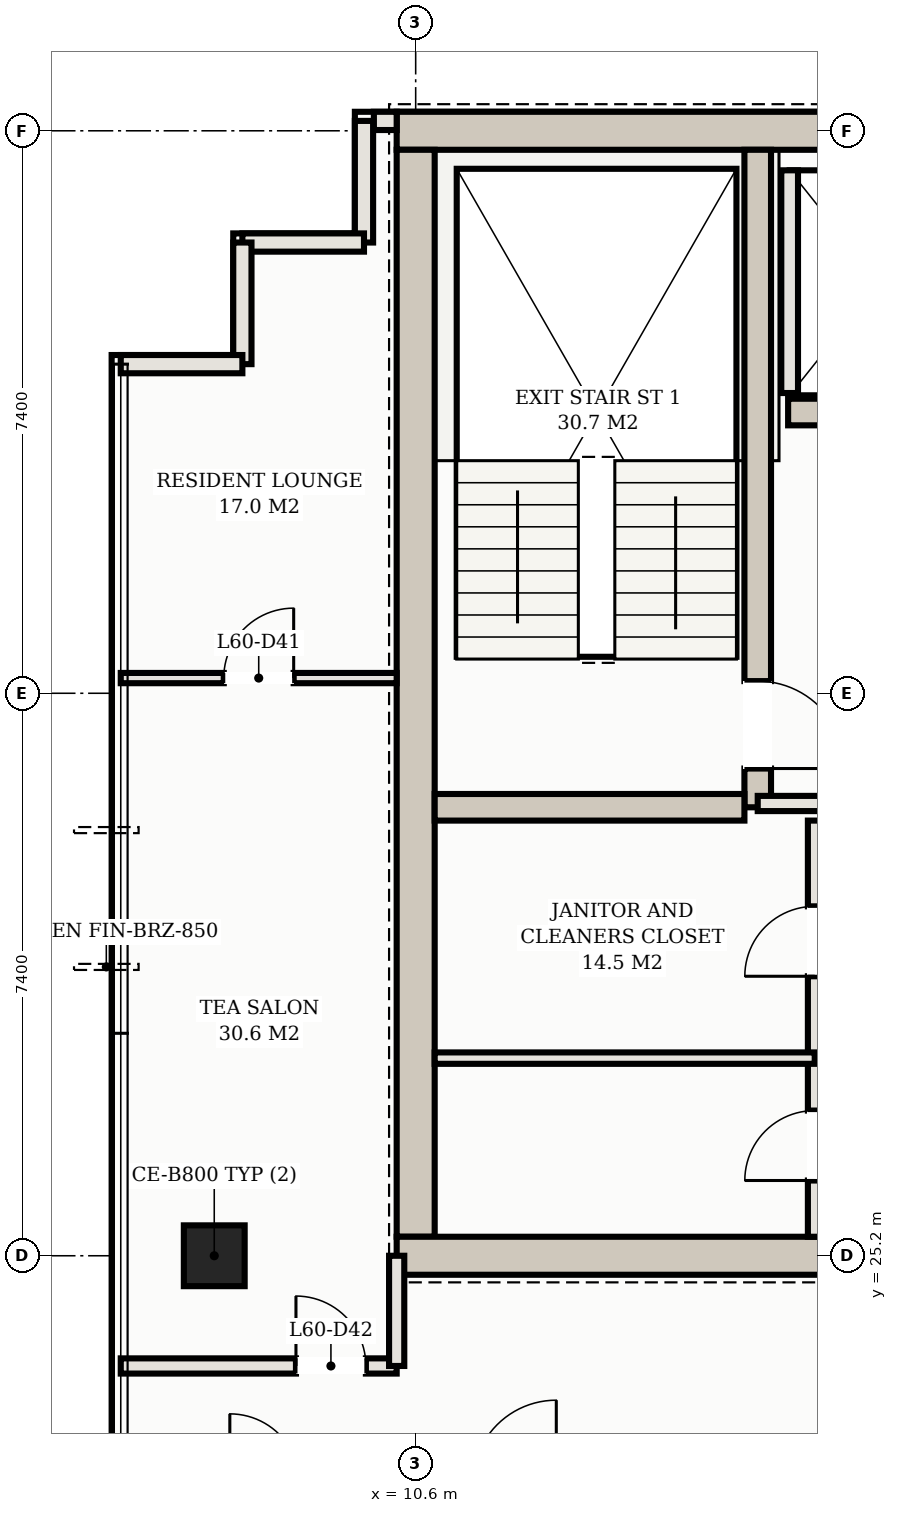
"""IFC4 building model, lengths in metres.
Left out: names, types, materials, properties, quantities, classifications, styles, units other than length and angle.
Written with IfcOpenShell. Run it as: python <this file> out.ifc"""

import sys

from ifc_helpers import new_model, si_unit, direction, frame, frame_2d, origin, origin_2d, place, context, subcontext, project, spatial, rectangle, hollow_rectangle, extrude, element, fill, save


model = new_model("IFC4")
c1 = context("Model", 3, precision=1e-05, world=origin(), true_north=direction((0.0, 1.0)))
c2 = subcontext(c1, "Body", "Model", "MODEL_VIEW")
j1 = project(units=[si_unit("LENGTHUNIT", "METRE"), si_unit("PLANEANGLEUNIT", "RADIAN")], contexts=[c1])
p1 = place(None, origin())
s1 = spatial("IfcSite", under=j1, at=p1, CompositionType="ELEMENT")
p2 = place(p1, origin())
s2 = spatial("IfcBuilding", under=s1, at=p2, CompositionType="ELEMENT")
p3 = place(p2, frame((0.0, 0.0, 219.8)))
s3 = spatial("IfcBuildingStorey", under=s2, at=p3, CompositionType="ELEMENT", Elevation=219.8)
p4 = place(p3, frame((10.35, 40.0, 0.0), z_axis=(0.0, 0.0, 1.0), x_axis=(1.0, 0.0, 0.0)))
e1 = element("IfcWall", 1, at=p4, inside=s3, PredefinedType="SHEAR", context=c2, shape_type="SweptSolid", body=[
    extrude(rectangle(XDim=32.3, YDim=0.5, at=frame_2d((16.15, 0.0))), origin(), (0.0, 0.0, 1.0), 3.11),
])
p5 = place(p3, frame((10.6, 25.45, 0.0), z_axis=(0.0, 0.0, 1.0), x_axis=(0.0, 1.0, 0.0)))
e2 = element("IfcWall", 2, at=p5, inside=s3, PredefinedType="SHEAR", context=c2, shape_type="SweptSolid", body=[
    extrude(rectangle(XDim=14.3, YDim=0.5, at=frame_2d((7.15, 0.0))), origin(), (0.0, 0.0, 1.0), 3.11),
])
p6 = place(p3, frame((10.35, 25.2, 0.0), z_axis=(0.0, 0.0, 1.0), x_axis=(1.0, 0.0, 0.0)))
e3 = element("IfcWall", 3, at=p6, inside=s3, PredefinedType="SHEAR", context=c2, shape_type="SweptSolid", body=[
    extrude(rectangle(XDim=8.05, YDim=0.5, at=frame_2d((4.025, 0.0))), origin(), (0.0, 0.0, 1.0), 3.11),
])
p7 = place(p6, frame((6.15, 0.0, 0.0)))
e4 = element("IfcOpeningElement", 4, at=p7, cuts=e3, PredefinedType="OPENING", context=c2, shape_type="SweptSolid", body=[
    extrude(rectangle(XDim=1.25, YDim=2.2, at=frame_2d((0.625, 1.1))), frame((0.0, 0.26, 0.0), z_axis=(0.0, -1.0, 0.0), x_axis=(1.0, 0.0, 0.0)), (0.0, 0.0, 1.0), 0.52),
])
p8 = place(p3, frame((15.1, 31.1, 0.0), z_axis=(0.0, 0.0, 1.0), x_axis=(0.0, 1.0, 0.0)))
e5 = element("IfcWall", 5, at=p8, inside=s3, PredefinedType="SHEAR", context=c2, shape_type="SweptSolid", body=[
    extrude(rectangle(XDim=8.65, YDim=0.35, at=frame_2d((4.325, 0.0))), origin(), (0.0, 0.0, 1.0), 3.11),
])
p9 = place(p8, frame((0.51, 0.0, 0.0)))
e6 = element("IfcOpeningElement", 6, at=p9, cuts=e5, PredefinedType="OPENING", context=c2, shape_type="SweptSolid", body=[
    extrude(rectangle(XDim=1.15, YDim=2.2, at=frame_2d((0.575, 1.1))), frame((0.0, 0.185, 0.0), z_axis=(0.0, -1.0, 0.0), x_axis=(1.0, 0.0, 0.0)), (0.0, 0.0, 1.0), 0.37),
])
p10 = place(p3, frame((10.85, 31.1, 0.0), z_axis=(0.0, 0.0, 1.0), x_axis=(1.0, 0.0, 0.0)))
e7 = element("IfcWall", 7, at=p10, inside=s3, PredefinedType="SHEAR", context=c2, shape_type="SweptSolid", body=[
    extrude(rectangle(XDim=4.075, YDim=0.35, at=frame_2d((2.038, 0.0))), origin(), (0.0, 0.0, 1.0), 3.11),
])
p11 = place(p3, frame((15.5, 36.3, 0.0), z_axis=(0.0, 0.0, 1.0), x_axis=(1.0, 0.0, 0.0)))
e8 = element("IfcWall", 8, at=p11, inside=s3, PredefinedType="SHEAR", context=c2, shape_type="SweptSolid", body=[
    extrude(rectangle(XDim=22.0, YDim=0.35, at=frame_2d((11.0, 0.0))), origin(), (0.0, 0.0, 1.0), 3.11),
])
p12 = place(p11, frame((0.65, 0.0, 0.0)))
e9 = element("IfcOpeningElement", 9, at=p12, cuts=e8, PredefinedType="OPENING", context=c2, shape_type="SweptSolid", body=[
    extrude(rectangle(XDim=1.1, YDim=2.15, at=frame_2d((0.55, 1.075))), frame((0.0, 0.185, 0.0), z_axis=(0.0, -1.0, 0.0), x_axis=(1.0, 0.0, 0.0)), (0.0, 0.0, 1.0), 0.37),
])
p13 = place(p11, frame((20.25, 0.0, 0.0)))
e10 = element("IfcOpeningElement", 10, at=p13, cuts=e8, PredefinedType="OPENING", context=c2, shape_type="SweptSolid", body=[
    extrude(rectangle(XDim=1.1, YDim=2.15, at=frame_2d((0.55, 1.075))), frame((0.0, 0.185, 0.0), z_axis=(0.0, -1.0, 0.0), x_axis=(1.0, 0.0, 0.0)), (0.0, 0.0, 1.0), 0.37),
])
p14 = place(p11, frame((17.05, 0.0, 0.0)))
e11 = element("IfcOpeningElement", 11, at=p14, cuts=e8, PredefinedType="OPENING", context=c2, shape_type="SweptSolid", body=[
    extrude(rectangle(XDim=1.3, YDim=2.2, at=frame_2d((0.65, 1.1))), frame((0.0, 0.185, 0.0), z_axis=(0.0, -1.0, 0.0), x_axis=(1.0, 0.0, 0.0)), (0.0, 0.0, 1.0), 0.37),
])
p15 = place(p11, frame((3.95, 0.0, 0.0)))
e12 = element("IfcOpeningElement", 12, at=p15, cuts=e8, PredefinedType="OPENING", context=c2, shape_type="SweptSolid", body=[
    extrude(rectangle(XDim=1.1, YDim=2.15, at=frame_2d((0.55, 1.075))), frame((0.0, 0.185, 0.0), z_axis=(0.0, -1.0, 0.0), x_axis=(1.0, 0.0, 0.0)), (0.0, 0.0, 1.0), 0.37),
])
p16 = place(p11, frame((6.55, 0.0, 0.0)))
e13 = element("IfcOpeningElement", 13, at=p16, cuts=e8, PredefinedType="OPENING", context=c2, shape_type="SweptSolid", body=[
    extrude(rectangle(XDim=1.1, YDim=2.15, at=frame_2d((0.55, 1.075))), frame((0.0, 0.185, 0.0), z_axis=(0.0, -1.0, 0.0), x_axis=(1.0, 0.0, 0.0)), (0.0, 0.0, 1.0), 0.37),
])
p17 = place(p11, frame((9.15, 0.0, 0.0)))
e14 = element("IfcOpeningElement", 14, at=p17, cuts=e8, PredefinedType="OPENING", context=c2, shape_type="SweptSolid", body=[
    extrude(rectangle(XDim=1.1, YDim=2.15, at=frame_2d((0.55, 1.075))), frame((0.0, 0.185, 0.0), z_axis=(0.0, -1.0, 0.0), x_axis=(1.0, 0.0, 0.0)), (0.0, 0.0, 1.0), 0.37),
])
p18 = place(p3, frame((7.95, 25.2, 0.0), z_axis=(0.0, 0.0, 1.0), x_axis=(1.0, 0.0, 0.0)))
e15 = element("IfcColumn", 15, at=p18, inside=s3, PredefinedType="COLUMN", context=c2, shape_type="SweptSolid", body=[
    extrude(hollow_rectangle(XDim=0.8, YDim=0.8, WallThickness=0.028, at=origin_2d()), origin(), (0.0, 0.0, 1.0), 3.3),
])
p19 = place(p3, frame((15.52, 36.55, 0.0), z_axis=(0.0, 0.0, 1.0), x_axis=(0.0, 1.0, 0.0)))
e16 = element("IfcWall", 16, at=p19, inside=s3, PredefinedType="SOLIDWALL", context=c2, shape_type="SweptSolid", body=[
    extrude(rectangle(XDim=2.93, YDim=0.22, at=frame_2d((1.465, 0.0))), origin(), (0.0, 0.0, 1.0), 3.11),
])
p20 = place(p3, frame((10.35, 40.13, 0.0), z_axis=(0.0, 0.0, 1.0), x_axis=(-1.0, 0.0, 0.0)))
e17 = element("IfcWall", 17, at=p20, inside=s3, PredefinedType="SOLIDWALL", context=c2, shape_type="SweptSolid", body=[
    extrude(rectangle(XDim=0.3, YDim=0.24, at=frame_2d((0.15, 0.0))), origin(), (0.0, 0.0, 1.0), 3.11),
])
for number, where, z_axis, x_axis in (
    (18, (9.92, 40.13, 0.0), (0.0, 0.0, 1.0), (0.0, -1.0, 0.0)),
    (19, (9.92, 38.53, 0.0), (0.0, 0.0, 1.0), (-1.0, 0.0, 0.0)),
):
    element("IfcWall", number, at=place(p3, frame(where, z_axis=z_axis, x_axis=x_axis)), inside=s3, PredefinedType="SOLIDWALL", context=c2, shape_type="SweptSolid", body=[
        extrude(rectangle(XDim=1.6, YDim=0.24, at=frame_2d((0.8, 0.0))), origin(), (0.0, 0.0, 1.0), 3.11),
    ])
for number, where, z_axis, x_axis in (
    (20, (8.32, 38.53, 0.0), (0.0, 0.0, 1.0), (0.0, -1.0, 0.0)),
    (21, (8.32, 36.93, 0.0), (0.0, 0.0, 1.0), (-1.0, 0.0, 0.0)),
):
    element("IfcWall", number, at=place(p3, frame(where, z_axis=z_axis, x_axis=x_axis)), inside=s3, PredefinedType="SOLIDWALL", context=c2, shape_type="SweptSolid", body=[
        extrude(rectangle(XDim=1.6, YDim=0.24, at=frame_2d((0.8, 0.0))), origin(), (0.0, 0.0, 1.0), 3.11),
    ])
p21 = place(p3, frame((15.1, 31.15, 0.0), z_axis=(0.0, 0.0, 1.0), x_axis=(1.0, 0.0, 0.0)))
e22 = element("IfcWall", 22, at=p21, inside=s3, PredefinedType="PARTITIONING", context=c2, shape_type="SweptSolid", body=[
    extrude(rectangle(XDim=3.25, YDim=0.2, at=frame_2d((1.625, 0.0))), origin(), (0.0, 0.0, 1.0), 2.43),
])
p22 = place(p21, frame((1.275, 0.0, 0.0)))
e23 = element("IfcOpeningElement", 23, at=p22, cuts=e22, PredefinedType="OPENING", context=c2, shape_type="SweptSolid", body=[
    extrude(rectangle(XDim=1.25, YDim=2.2, at=frame_2d((0.625, 1.1))), frame((0.0, 0.11, 0.0), z_axis=(0.0, -1.0, 0.0), x_axis=(1.0, 0.0, 0.0)), (0.0, 0.0, 1.0), 0.22),
])
p23 = place(p3, frame((15.85, 25.45, 0.0), z_axis=(0.0, 0.0, 1.0), x_axis=(0.0, 1.0, 0.0)))
e24 = element("IfcWall", 24, at=p23, inside=s3, PredefinedType="PARTITIONING", context=c2, shape_type="SweptSolid", body=[
    extrude(rectangle(XDim=5.475, YDim=0.18, at=frame_2d((2.738, 0.0))), origin(), (0.0, 0.0, 1.0), 2.43),
])
p24 = place(p23, frame((0.74, 0.0, 0.0)))
e25 = element("IfcOpeningElement", 25, at=p24, cuts=e24, PredefinedType="OPENING", context=c2, shape_type="SweptSolid", body=[
    extrude(rectangle(XDim=0.92, YDim=2.15, at=frame_2d((0.46, 1.075))), frame((0.0, 0.1, 0.0), z_axis=(0.0, -1.0, 0.0), x_axis=(1.0, 0.0, 0.0)), (0.0, 0.0, 1.0), 0.2),
])
p25 = place(p23, frame((3.427, 0.0, 0.0)))
e26 = element("IfcOpeningElement", 26, at=p25, cuts=e24, PredefinedType="OPENING", context=c2, shape_type="SweptSolid", body=[
    extrude(rectangle(XDim=0.92, YDim=2.15, at=frame_2d((0.46, 1.075))), frame((0.0, 0.1, 0.0), z_axis=(0.0, -1.0, 0.0), x_axis=(1.0, 0.0, 0.0)), (0.0, 0.0, 1.0), 0.2),
])
p26 = place(p3, frame((10.85, 27.8, 0.0), z_axis=(0.0, 0.0, 1.0), x_axis=(1.0, 0.0, 0.0)))
e27 = element("IfcWall", 27, at=p26, inside=s3, PredefinedType="PARTITIONING", context=c2, shape_type="SweptSolid", body=[
    extrude(rectangle(XDim=5.0, YDim=0.15, at=frame_2d((2.5, 0.0))), origin(), (0.0, 0.0, 1.0), 2.43),
])
p27 = place(p3, frame((6.72, 23.75, 0.0), z_axis=(0.0, 0.0, 1.0), x_axis=(1.0, 0.0, 0.0)))
e28 = element("IfcWall", 28, at=p27, inside=s3, PredefinedType="PARTITIONING", context=c2, shape_type="SweptSolid", body=[
    extrude(rectangle(XDim=3.63, YDim=0.2, at=frame_2d((1.815, 0.0))), origin(), (0.0, 0.0, 1.0), 2.43),
])
p28 = place(p27, frame((2.305, 0.0, 0.0)))
e29 = element("IfcOpeningElement", 29, at=p28, cuts=e28, PredefinedType="OPENING", context=c2, shape_type="SweptSolid", body=[
    extrude(rectangle(XDim=0.92, YDim=2.15, at=frame_2d((0.46, 1.075))), frame((0.0, 0.11, 0.0), z_axis=(0.0, -1.0, 0.0), x_axis=(1.0, 0.0, 0.0)), (0.0, 0.0, 1.0), 0.22),
])
p29 = place(p3, frame((10.35, 23.75, 0.0), z_axis=(0.0, 0.0, 1.0), x_axis=(0.0, 1.0, 0.0)))
e30 = element("IfcWall", 30, at=p29, inside=s3, PredefinedType="PARTITIONING", context=c2, shape_type="SweptSolid", body=[
    extrude(rectangle(XDim=1.45, YDim=0.2, at=frame_2d((0.725, 0.0))), origin(), (0.0, 0.0, 1.0), 2.43),
])
p30 = place(p3, frame((6.72, 32.8, 0.0), z_axis=(0.0, 0.0, 1.0), x_axis=(1.0, 0.0, 0.0)))
e31 = element("IfcWall", 31, at=p30, inside=s3, PredefinedType="PARTITIONING", context=c2, shape_type="SweptSolid", body=[
    extrude(rectangle(XDim=3.63, YDim=0.135, at=frame_2d((1.815, 0.0))), origin(), (0.0, 0.0, 1.0), 2.43),
])
p31 = place(p30, frame((1.355, 0.0, 0.0)))
e32 = element("IfcOpeningElement", 32, at=p31, cuts=e31, PredefinedType="OPENING", context=c2, shape_type="SweptSolid", body=[
    extrude(rectangle(XDim=0.92, YDim=2.15, at=frame_2d((0.46, 1.075))), frame((0.0, 0.078, 0.0), z_axis=(0.0, -1.0, 0.0), x_axis=(1.0, 0.0, 0.0)), (0.0, 0.0, 1.0), 0.155),
])
p32 = place(p9, frame((1.15, 0.0, 0.0), z_axis=(0.0, 0.0, 1.0), x_axis=(-1.0, 0.0, 0.0)))
e33 = element("IfcDoor", 33, at=p32, inside=s3, OperationType="SINGLE_SWING_RIGHT", PredefinedType="DOOR", context=c2, shape_type="SweptSolid", body=[
    extrude(rectangle(XDim=1.15, YDim=2.2, at=frame_2d((0.575, 1.1))), frame((0.0, 0.025, 0.0), z_axis=(0.0, -1.0, 0.0), x_axis=(1.0, 0.0, 0.0)), (0.0, 0.0, 1.0), 0.05),
])
fill(e6, e33)
p33 = place(p24, origin())
e34 = element("IfcDoor", 34, at=p33, inside=s3, OperationType="SINGLE_SWING_LEFT", PredefinedType="DOOR", context=c2, shape_type="SweptSolid", body=[
    extrude(rectangle(XDim=0.92, YDim=2.15, at=frame_2d((0.46, 1.075))), frame((0.0, 0.025, 0.0), z_axis=(0.0, -1.0, 0.0), x_axis=(1.0, 0.0, 0.0)), (0.0, 0.0, 1.0), 0.05),
])
fill(e25, e34)
p34 = place(p25, origin())
e35 = element("IfcDoor", 35, at=p34, inside=s3, OperationType="SINGLE_SWING_LEFT", PredefinedType="DOOR", context=c2, shape_type="SweptSolid", body=[
    extrude(rectangle(XDim=0.92, YDim=2.15, at=frame_2d((0.46, 1.075))), frame((0.0, 0.025, 0.0), z_axis=(0.0, -1.0, 0.0), x_axis=(1.0, 0.0, 0.0)), (0.0, 0.0, 1.0), 0.05),
])
fill(e26, e35)
p35 = place(p31, origin())
e36 = element("IfcDoor", 36, at=p35, inside=s3, OperationType="SINGLE_SWING_RIGHT", PredefinedType="DOOR", context=c2, shape_type="SweptSolid", body=[
    extrude(rectangle(XDim=0.92, YDim=2.15, at=frame_2d((0.46, 1.075))), frame((0.0, 0.025, 0.0), z_axis=(0.0, -1.0, 0.0), x_axis=(1.0, 0.0, 0.0)), (0.0, 0.0, 1.0), 0.05),
])
fill(e32, e36)
p36 = place(p28, origin())
e37 = element("IfcDoor", 37, at=p36, inside=s3, OperationType="SINGLE_SWING_LEFT", PredefinedType="DOOR", context=c2, shape_type="SweptSolid", body=[
    extrude(rectangle(XDim=0.92, YDim=2.15, at=frame_2d((0.46, 1.075))), frame((0.0, 0.025, 0.0), z_axis=(0.0, -1.0, 0.0), x_axis=(1.0, 0.0, 0.0)), (0.0, 0.0, 1.0), 0.05),
])
fill(e29, e37)
save(model, sys.argv[1])
